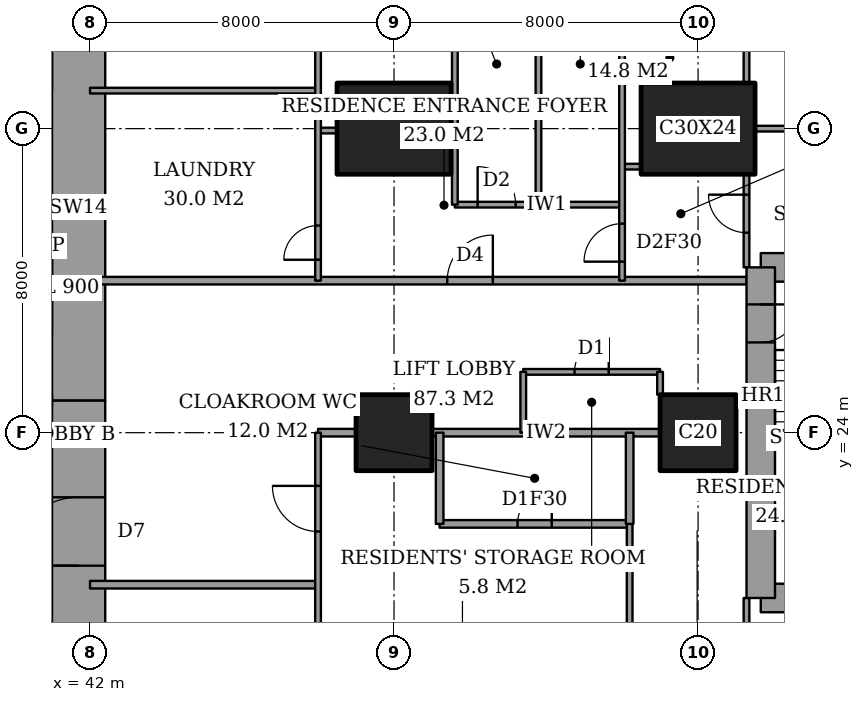
"""IFC4 building model, lengths in metres.
Left out: names, types, materials, properties, quantities, classifications, styles, units other than length and angle.
Written with IfcOpenShell. Run it as: python <this file> out.ifc"""

import sys

from ifc_helpers import new_model, si_unit, direction, frame, frame_2d, origin, origin_2d, place, context, subcontext, project, spatial, rectangle, extrude, element, fill, save


model = new_model("IFC4")
c1 = context("Model", 3, precision=1e-05, world=origin(), true_north=direction((0.0, 1.0)))
c2 = subcontext(c1, "Body", "Model", "MODEL_VIEW")
j1 = project(units=[si_unit("LENGTHUNIT", "METRE"), si_unit("PLANEANGLEUNIT", "RADIAN")], contexts=[c1])
p1 = place(None, origin())
s1 = spatial("IfcSite", under=j1, at=p1, CompositionType="ELEMENT")
p2 = place(p1, origin())
s2 = spatial("IfcBuilding", under=s1, at=p2, CompositionType="ELEMENT")
p3 = place(p2, frame((0.0, 0.0, 44.0)))
s3 = spatial("IfcBuildingStorey", under=s2, at=p3, CompositionType="ELEMENT", Elevation=44.0)
p4 = place(p3, frame((50.0, 24.0, 0.0), z_axis=(0.0, 0.0, 1.0), x_axis=(1.0, 0.0, 0.0)))
e1 = element("IfcColumn", 1, at=p4, inside=s3, PredefinedType="COLUMN", context=c2, shape_type="SweptSolid", body=[
    extrude(rectangle(XDim=2.0, YDim=2.0, at=origin_2d()), origin(), (0.0, 0.0, 1.0), 3.6),
])
p5 = place(p3, frame((50.0, 32.0, 0.0), z_axis=(0.0, 0.0, 1.0), x_axis=(1.0, 0.0, 0.0)))
e2 = element("IfcColumn", 2, at=p5, inside=s3, PredefinedType="COLUMN", context=c2, shape_type="SweptSolid", body=[
    extrude(rectangle(XDim=3.0, YDim=2.4, at=origin_2d()), origin(), (0.0, 0.0, 1.0), 3.6),
])
p6 = place(p3, frame((58.0, 24.0, 0.0), z_axis=(0.0, 0.0, 1.0), x_axis=(1.0, 0.0, 0.0)))
e3 = element("IfcColumn", 3, at=p6, inside=s3, PredefinedType="COLUMN", context=c2, shape_type="SweptSolid", body=[
    extrude(rectangle(XDim=2.0, YDim=2.0, at=origin_2d()), origin(), (0.0, 0.0, 1.0), 3.6),
])
p7 = place(p3, frame((58.0, 32.0, 0.0), z_axis=(0.0, 0.0, 1.0), x_axis=(1.0, 0.0, 0.0)))
e4 = element("IfcColumn", 4, at=p7, inside=s3, PredefinedType="COLUMN", context=c2, shape_type="SweptSolid", body=[
    extrude(rectangle(XDim=3.0, YDim=2.4, at=origin_2d()), origin(), (0.0, 0.0, 1.0), 3.6),
])
p8 = place(p3, frame((41.7, 13.0, 0.0), z_axis=(0.0, 0.0, 1.0), x_axis=(0.0, 1.0, 0.0)))
e5 = element("IfcWall", 5, at=p8, inside=s3, PredefinedType="SHEAR", context=c2, shape_type="SweptSolid", body=[
    extrude(rectangle(XDim=11.85, YDim=1.4, at=frame_2d((5.925, 0.0))), origin(), (0.0, 0.0, 1.0), 3.6),
])
p9 = place(p8, frame((7.5, 0.0, 0.0)))
e6 = element("IfcOpeningElement", 6, at=p9, cuts=e5, PredefinedType="OPENING", context=c2, shape_type="SweptSolid", body=[
    extrude(rectangle(XDim=1.8, YDim=2.4, at=frame_2d((0.9, 1.2))), frame((0.0, 0.71, 0.0), z_axis=(0.0, -1.0, 0.0), x_axis=(1.0, 0.0, 0.0)), (0.0, 0.0, 1.0), 1.42),
])
p10 = place(p3, frame((41.7, 24.85, 0.0), z_axis=(0.0, 0.0, 1.0), x_axis=(0.0, 1.0, 0.0)))
e7 = element("IfcWall", 7, at=p10, inside=s3, PredefinedType="SHEAR", context=c2, shape_type="SweptSolid", body=[
    extrude(rectangle(XDim=10.15, YDim=1.4, at=frame_2d((5.075, 0.0))), origin(), (0.0, 0.0, 1.0), 3.6),
])
for number, where, z_axis, x_axis in (
    (8, (59.65, 19.65, 0.0), (0.0, 0.0, 1.0), (1.0, 0.0, 0.0)),
    (9, (64.1, 28.35, 0.0), (0.0, 0.0, 1.0), (-1.0, 0.0, 0.0)),
):
    element("IfcWall", number, at=place(p3, frame(where, z_axis=z_axis, x_axis=x_axis)), inside=s3, PredefinedType="SHEAR", context=c2, shape_type="SweptSolid", body=[
        extrude(rectangle(XDim=4.45, YDim=0.75, at=frame_2d((2.225, 0.0))), origin(), (0.0, 0.0, 1.0), 3.6),
    ])
p11 = place(p3, frame((59.65, 28.35, 0.0), z_axis=(0.0, 0.0, 1.0), x_axis=(0.0, -1.0, 0.0)))
e10 = element("IfcWall", 10, at=p11, inside=s3, PredefinedType="SHEAR", context=c2, shape_type="SweptSolid", body=[
    extrude(rectangle(XDim=8.7, YDim=0.75, at=frame_2d((4.35, 0.0))), origin(), (0.0, 0.0, 1.0), 3.6),
])
p12 = place(p11, frame((0.975, 0.0, 0.0)))
e11 = element("IfcOpeningElement", 11, at=p12, cuts=e10, PredefinedType="OPENING", context=c2, shape_type="SweptSolid", body=[
    extrude(rectangle(XDim=1.0, YDim=2.1, at=frame_2d((0.5, 1.05))), frame((0.0, 0.385, 0.0), z_axis=(0.0, -1.0, 0.0), x_axis=(1.0, 0.0, 0.0)), (0.0, 0.0, 1.0), 0.77),
])
p13 = place(p3, frame((42.0, 20.0, 0.0), z_axis=(0.0, 0.0, 1.0), x_axis=(1.0, 0.0, 0.0)))
e12 = element("IfcWall", 12, at=p13, inside=s3, PredefinedType="PARTITIONING", context=c2, shape_type="SweptSolid", body=[
    extrude(rectangle(XDim=6.0, YDim=0.2, at=frame_2d((3.0, 0.0))), origin(), (0.0, 0.0, 1.0), 3.35),
])
p14 = place(p3, frame((51.2, 21.6, 0.0), z_axis=(0.0, 0.0, 1.0), x_axis=(1.0, 0.0, 0.0)))
e13 = element("IfcWall", 13, at=p14, inside=s3, PredefinedType="PARTITIONING", context=c2, shape_type="SweptSolid", body=[
    extrude(rectangle(XDim=5.0, YDim=0.2, at=frame_2d((2.5, 0.0))), origin(), (0.0, 0.0, 1.0), 3.35),
])
p15 = place(p14, frame((2.05, 0.0, 0.0)))
e14 = element("IfcOpeningElement", 14, at=p15, cuts=e13, PredefinedType="OPENING", context=c2, shape_type="SweptSolid", body=[
    extrude(rectangle(XDim=0.9, YDim=2.1, at=frame_2d((0.45, 1.05))), frame((0.0, 0.11, 0.0), z_axis=(0.0, -1.0, 0.0), x_axis=(1.0, 0.0, 0.0)), (0.0, 0.0, 1.0), 0.22),
])
p16 = place(p3, frame((48.0, 24.0, 0.0), z_axis=(0.0, 0.0, 1.0), x_axis=(1.0, 0.0, 0.0)))
e15 = element("IfcWall", 15, at=p16, inside=s3, PredefinedType="PARTITIONING", context=c2, shape_type="SweptSolid", body=[
    extrude(rectangle(XDim=1.0, YDim=0.2, at=frame_2d((0.5, 0.0))), origin(), (0.0, 0.0, 1.0), 3.35),
])
p17 = place(p3, frame((51.0, 24.0, 0.0), z_axis=(0.0, 0.0, 1.0), x_axis=(1.0, 0.0, 0.0)))
e16 = element("IfcWall", 16, at=p17, inside=s3, PredefinedType="PARTITIONING", context=c2, shape_type="SweptSolid", body=[
    extrude(rectangle(XDim=6.0, YDim=0.2, at=frame_2d((3.0, 0.0))), origin(), (0.0, 0.0, 1.0), 3.35),
])
p18 = place(p3, frame((53.4, 25.6, 0.0), z_axis=(0.0, 0.0, 1.0), x_axis=(1.0, 0.0, 0.0)))
e17 = element("IfcWall", 17, at=p18, inside=s3, PredefinedType="PARTITIONING", context=c2, shape_type="SweptSolid", body=[
    extrude(rectangle(XDim=3.6, YDim=0.15, at=frame_2d((1.8, 0.0))), origin(), (0.0, 0.0, 1.0), 3.35),
])
p19 = place(p18, frame((1.35, 0.0, 0.0)))
e18 = element("IfcOpeningElement", 18, at=p19, cuts=e17, PredefinedType="OPENING", context=c2, shape_type="SweptSolid", body=[
    extrude(rectangle(XDim=0.9, YDim=2.1, at=frame_2d((0.45, 1.05))), frame((0.0, 0.085, 0.0), z_axis=(0.0, -1.0, 0.0), x_axis=(1.0, 0.0, 0.0)), (0.0, 0.0, 1.0), 0.17),
])
p20 = place(p3, frame((42.0, 28.0, 0.0), z_axis=(0.0, 0.0, 1.0), x_axis=(1.0, 0.0, 0.0)))
e19 = element("IfcWall", 19, at=p20, inside=s3, PredefinedType="PARTITIONING", context=c2, shape_type="SweptSolid", body=[
    extrude(rectangle(XDim=17.275, YDim=0.2, at=frame_2d((8.637, 0.0))), origin(), (0.0, 0.0, 1.0), 3.35),
])
p21 = place(p20, frame((9.4, 0.0, 0.0)))
e20 = element("IfcOpeningElement", 20, at=p21, cuts=e19, PredefinedType="OPENING", context=c2, shape_type="SweptSolid", body=[
    extrude(rectangle(XDim=1.2, YDim=2.4, at=frame_2d((0.6, 1.2))), frame((0.0, 0.11, 0.0), z_axis=(0.0, -1.0, 0.0), x_axis=(1.0, 0.0, 0.0)), (0.0, 0.0, 1.0), 0.22),
])
p22 = place(p3, frame((51.6, 30.0, 0.0), z_axis=(0.0, 0.0, 1.0), x_axis=(1.0, 0.0, 0.0)))
e21 = element("IfcWall", 21, at=p22, inside=s3, PredefinedType="PARTITIONING", context=c2, shape_type="SweptSolid", body=[
    extrude(rectangle(XDim=4.4, YDim=0.15, at=frame_2d((2.2, 0.0))), origin(), (0.0, 0.0, 1.0), 3.35),
])
p23 = place(p22, frame((0.6, 0.0, 0.0)))
e22 = element("IfcOpeningElement", 22, at=p23, cuts=e21, PredefinedType="OPENING", context=c2, shape_type="SweptSolid", body=[
    extrude(rectangle(XDim=1.0, YDim=2.1, at=frame_2d((0.5, 1.05))), frame((0.0, 0.085, 0.0), z_axis=(0.0, -1.0, 0.0), x_axis=(1.0, 0.0, 0.0)), (0.0, 0.0, 1.0), 0.17),
])
p24 = place(p3, frame((56.0, 31.0, 0.0), z_axis=(0.0, 0.0, 1.0), x_axis=(1.0, 0.0, 0.0)))
e23 = element("IfcWall", 23, at=p24, inside=s3, PredefinedType="PARTITIONING", context=c2, shape_type="SweptSolid", body=[
    extrude(rectangle(XDim=0.5, YDim=0.15, at=frame_2d((0.25, 0.0))), origin(), (0.0, 0.0, 1.0), 3.35),
])
p25 = place(p3, frame((48.0, 31.95, 0.0), z_axis=(0.0, 0.0, 1.0), x_axis=(1.0, 0.0, 0.0)))
e24 = element("IfcWall", 24, at=p25, inside=s3, PredefinedType="PARTITIONING", context=c2, shape_type="SweptSolid", body=[
    extrude(rectangle(XDim=0.5, YDim=0.15, at=frame_2d((0.25, 0.0))), origin(), (0.0, 0.0, 1.0), 2.634),
])
p26 = place(p3, frame((59.5, 32.0, 0.0), z_axis=(0.0, 0.0, 1.0), x_axis=(1.0, 0.0, 0.0)))
e25 = element("IfcWall", 25, at=p26, inside=s3, PredefinedType="PARTITIONING", context=c2, shape_type="SweptSolid", body=[
    extrude(rectangle(XDim=5.15, YDim=0.15, at=frame_2d((2.575, 0.0))), origin(), (0.0, 0.0, 1.0), 2.634),
])
p27 = place(p3, frame((42.0, 33.0, 0.0), z_axis=(0.0, 0.0, 1.0), x_axis=(1.0, 0.0, 0.0)))
e26 = element("IfcWall", 26, at=p27, inside=s3, PredefinedType="PARTITIONING", context=c2, shape_type="SweptSolid", body=[
    extrude(rectangle(XDim=6.0, YDim=0.15, at=frame_2d((3.0, 0.0))), origin(), (0.0, 0.0, 1.0), 3.35),
])
p28 = place(p3, frame((48.0, 10.6, 0.0), z_axis=(0.0, 0.0, 1.0), x_axis=(0.0, 1.0, 0.0)))
e27 = element("IfcWall", 27, at=p28, inside=s3, PredefinedType="PARTITIONING", context=c2, shape_type="SweptSolid", body=[
    extrude(rectangle(XDim=13.4, YDim=0.15, at=frame_2d((6.7, 0.0))), origin(), (0.0, 0.0, 1.0), 3.35),
])
p29 = place(p28, frame((10.8, 0.0, 0.0)))
e28 = element("IfcOpeningElement", 28, at=p29, cuts=e27, PredefinedType="OPENING", context=c2, shape_type="SweptSolid", body=[
    extrude(rectangle(XDim=1.2, YDim=2.4, at=frame_2d((0.6, 1.2))), frame((0.0, 0.085, 0.0), z_axis=(0.0, -1.0, 0.0), x_axis=(1.0, 0.0, 0.0)), (0.0, 0.0, 1.0), 0.17),
])
p30 = place(p28, frame((6.7, 0.0, 0.0)))
e29 = element("IfcOpeningElement", 29, at=p30, cuts=e27, PredefinedType="OPENING", context=c2, shape_type="SweptSolid", body=[
    extrude(rectangle(XDim=0.9, YDim=2.1, at=frame_2d((0.45, 1.05))), frame((0.0, 0.085, 0.0), z_axis=(0.0, -1.0, 0.0), x_axis=(1.0, 0.0, 0.0)), (0.0, 0.0, 1.0), 0.17),
])
p31 = place(p3, frame((48.0, 28.0, 0.0), z_axis=(0.0, 0.0, 1.0), x_axis=(0.0, 1.0, 0.0)))
e30 = element("IfcWall", 30, at=p31, inside=s3, PredefinedType="PARTITIONING", context=c2, shape_type="SweptSolid", body=[
    extrude(rectangle(XDim=9.4, YDim=0.15, at=frame_2d((4.7, 0.0))), origin(), (0.0, 0.0, 1.0), 3.35),
])
p32 = place(p31, frame((0.55, 0.0, 0.0)))
e31 = element("IfcOpeningElement", 31, at=p32, cuts=e30, PredefinedType="OPENING", context=c2, shape_type="SweptSolid", body=[
    extrude(rectangle(XDim=0.9, YDim=2.1, at=frame_2d((0.45, 1.05))), frame((0.0, 0.085, 0.0), z_axis=(0.0, -1.0, 0.0), x_axis=(1.0, 0.0, 0.0)), (0.0, 0.0, 1.0), 0.17),
])
p33 = place(p3, frame((51.2, 21.6, 0.0), z_axis=(0.0, 0.0, 1.0), x_axis=(0.0, 1.0, 0.0)))
e32 = element("IfcWall", 32, at=p33, inside=s3, PredefinedType="PARTITIONING", context=c2, shape_type="SweptSolid", body=[
    extrude(rectangle(XDim=2.4, YDim=0.2, at=frame_2d((1.2, 0.0))), origin(), (0.0, 0.0, 1.0), 3.35),
])
p34 = place(p3, frame((51.6, 30.0, 0.0), z_axis=(0.0, 0.0, 1.0), x_axis=(0.0, 1.0, 0.0)))
e33 = element("IfcWall", 33, at=p34, inside=s3, PredefinedType="PARTITIONING", context=c2, shape_type="SweptSolid", body=[
    extrude(rectangle(XDim=7.4, YDim=0.15, at=frame_2d((3.7, 0.0))), origin(), (0.0, 0.0, 1.0), 3.35),
])
p35 = place(p3, frame((53.4, 24.0, 0.0), z_axis=(0.0, 0.0, 1.0), x_axis=(0.0, 1.0, 0.0)))
e34 = element("IfcWall", 34, at=p35, inside=s3, PredefinedType="PARTITIONING", context=c2, shape_type="SweptSolid", body=[
    extrude(rectangle(XDim=1.6, YDim=0.15, at=frame_2d((0.8, 0.0))), origin(), (0.0, 0.0, 1.0), 3.35),
])
p36 = place(p3, frame((53.8, 30.0, 0.0), z_axis=(0.0, 0.0, 1.0), x_axis=(0.0, 1.0, 0.0)))
e35 = element("IfcWall", 35, at=p36, inside=s3, PredefinedType="PARTITIONING", context=c2, shape_type="SweptSolid", body=[
    extrude(rectangle(XDim=7.4, YDim=0.15, at=frame_2d((3.7, 0.0))), origin(), (0.0, 0.0, 1.0), 3.35),
])
p37 = place(p3, frame((56.0, 28.0, 0.0), z_axis=(0.0, 0.0, 1.0), x_axis=(0.0, 1.0, 0.0)))
e36 = element("IfcWall", 36, at=p37, inside=s3, PredefinedType="PARTITIONING", context=c2, shape_type="SweptSolid", body=[
    extrude(rectangle(XDim=9.4, YDim=0.15, at=frame_2d((4.7, 0.0))), origin(), (0.0, 0.0, 1.0), 3.35),
])
p38 = place(p37, frame((0.5, 0.0, 0.0)))
e37 = element("IfcOpeningElement", 37, at=p38, cuts=e36, PredefinedType="OPENING", context=c2, shape_type="SweptSolid", body=[
    extrude(rectangle(XDim=1.0, YDim=2.1, at=frame_2d((0.5, 1.05))), frame((0.0, 0.085, 0.0), z_axis=(0.0, -1.0, 0.0), x_axis=(1.0, 0.0, 0.0)), (0.0, 0.0, 1.0), 0.17),
])
p39 = place(p3, frame((56.2, 21.6, 0.0), z_axis=(0.0, 0.0, 1.0), x_axis=(0.0, 1.0, 0.0)))
e38 = element("IfcWall", 38, at=p39, inside=s3, PredefinedType="PARTITIONING", context=c2, shape_type="SweptSolid", body=[
    extrude(rectangle(XDim=2.4, YDim=0.2, at=frame_2d((1.2, 0.0))), origin(), (0.0, 0.0, 1.0), 3.35),
])
p40 = place(p3, frame((56.2, 10.6, 0.0), z_axis=(0.0, 0.0, 1.0), x_axis=(0.0, 1.0, 0.0)))
e39 = element("IfcWall", 39, at=p40, inside=s3, PredefinedType="PARTITIONING", context=c2, shape_type="SweptSolid", body=[
    extrude(rectangle(XDim=11.0, YDim=0.15, at=frame_2d((5.5, 0.0))), origin(), (0.0, 0.0, 1.0), 3.35),
])
p41 = place(p40, frame((7.0, 0.0, 0.0)))
e40 = element("IfcOpeningElement", 40, at=p41, cuts=e39, PredefinedType="OPENING", context=c2, shape_type="SweptSolid", body=[
    extrude(rectangle(XDim=1.0, YDim=2.1, at=frame_2d((0.5, 1.05))), frame((0.0, 0.085, 0.0), z_axis=(0.0, -1.0, 0.0), x_axis=(1.0, 0.0, 0.0)), (0.0, 0.0, 1.0), 0.17),
])
p42 = place(p3, frame((57.0, 25.0, 0.0), z_axis=(0.0, 0.0, 1.0), x_axis=(0.0, 1.0, 0.0)))
e41 = element("IfcWall", 41, at=p42, inside=s3, PredefinedType="PARTITIONING", context=c2, shape_type="SweptSolid", body=[
    extrude(rectangle(XDim=0.6, YDim=0.15, at=frame_2d((0.3, 0.0))), origin(), (0.0, 0.0, 1.0), 3.35),
])
p43 = place(p3, frame((59.275, 17.2, 0.0), z_axis=(0.0, 0.0, 1.0), x_axis=(0.0, 1.0, 0.0)))
e42 = element("IfcWall", 42, at=p43, inside=s3, PredefinedType="PARTITIONING", context=c2, shape_type="SweptSolid", body=[
    extrude(rectangle(XDim=2.45, YDim=0.15, at=frame_2d((1.225, 0.0))), origin(), (0.0, 0.0, 1.0), 3.35),
])
p44 = place(p43, frame((0.538, 0.0, 0.0)))
e43 = element("IfcOpeningElement", 43, at=p44, cuts=e42, PredefinedType="OPENING", context=c2, shape_type="SweptSolid", body=[
    extrude(rectangle(XDim=1.0, YDim=2.1, at=frame_2d((0.5, 1.05))), frame((0.0, 0.085, 0.0), z_axis=(0.0, -1.0, 0.0), x_axis=(1.0, 0.0, 0.0)), (0.0, 0.0, 1.0), 0.17),
])
p45 = place(p3, frame((59.275, 28.35, 0.0), z_axis=(0.0, 0.0, 1.0), x_axis=(0.0, 1.0, 0.0)))
e44 = element("IfcWall", 44, at=p45, inside=s3, PredefinedType="PARTITIONING", context=c2, shape_type="SweptSolid", body=[
    extrude(rectangle(XDim=2.45, YDim=0.15, at=frame_2d((1.225, 0.0))), origin(), (0.0, 0.0, 1.0), 3.35),
])
p46 = place(p45, frame((0.913, 0.0, 0.0)))
e45 = element("IfcOpeningElement", 45, at=p46, cuts=e44, PredefinedType="OPENING", context=c2, shape_type="SweptSolid", body=[
    extrude(rectangle(XDim=1.0, YDim=2.1, at=frame_2d((0.5, 1.05))), frame((0.0, 0.085, 0.0), z_axis=(0.0, -1.0, 0.0), x_axis=(1.0, 0.0, 0.0)), (0.0, 0.0, 1.0), 0.17),
])
p47 = place(p3, frame((59.275, 33.2, 0.0), z_axis=(0.0, 0.0, 1.0), x_axis=(0.0, 1.0, 0.0)))
e46 = element("IfcWall", 46, at=p47, inside=s3, PredefinedType="PARTITIONING", context=c2, shape_type="SweptSolid", body=[
    extrude(rectangle(XDim=4.2, YDim=0.15, at=frame_2d((2.1, 0.0))), origin(), (0.0, 0.0, 1.0), 3.35),
])
p48 = place(p15, origin())
e47 = element("IfcDoor", 47, at=p48, inside=s3, OperationType="SINGLE_SWING_LEFT", PredefinedType="DOOR", context=c2, shape_type="SweptSolid", body=[
    extrude(rectangle(XDim=0.9, YDim=2.1, at=frame_2d((0.45, 1.05))), frame((0.0, 0.025, 0.0), z_axis=(0.0, -1.0, 0.0), x_axis=(1.0, 0.0, 0.0)), (0.0, 0.0, 1.0), 0.05),
])
fill(e14, e47)
p49 = place(p29, origin())
e48 = element("IfcDoor", 48, at=p49, inside=s3, OperationType="SINGLE_SWING_LEFT", PredefinedType="DOOR", context=c2, shape_type="SweptSolid", body=[
    extrude(rectangle(XDim=1.2, YDim=2.4, at=frame_2d((0.6, 1.2))), frame((0.0, 0.025, 0.0), z_axis=(0.0, -1.0, 0.0), x_axis=(1.0, 0.0, 0.0)), (0.0, 0.0, 1.0), 0.05),
])
fill(e28, e48)
p50 = place(p46, origin())
e49 = element("IfcDoor", 49, at=p50, inside=s3, OperationType="SINGLE_SWING_LEFT", PredefinedType="DOOR", context=c2, shape_type="SweptSolid", body=[
    extrude(rectangle(XDim=1.0, YDim=2.1, at=frame_2d((0.5, 1.05))), frame((0.0, 0.025, 0.0), z_axis=(0.0, -1.0, 0.0), x_axis=(1.0, 0.0, 0.0)), (0.0, 0.0, 1.0), 0.05),
])
fill(e45, e49)
p51 = place(p38, origin())
e50 = element("IfcDoor", 50, at=p51, inside=s3, OperationType="SINGLE_SWING_RIGHT", PredefinedType="DOOR", context=c2, shape_type="SweptSolid", body=[
    extrude(rectangle(XDim=1.0, YDim=2.1, at=frame_2d((0.5, 1.05))), frame((0.0, 0.025, 0.0), z_axis=(0.0, -1.0, 0.0), x_axis=(1.0, 0.0, 0.0)), (0.0, 0.0, 1.0), 0.05),
])
fill(e37, e50)
p52 = place(p21, origin())
e51 = element("IfcDoor", 51, at=p52, inside=s3, OperationType="SINGLE_SWING_LEFT", PredefinedType="DOOR", context=c2, shape_type="SweptSolid", body=[
    extrude(rectangle(XDim=1.2, YDim=2.4, at=frame_2d((0.6, 1.2))), frame((0.0, 0.025, 0.0), z_axis=(0.0, -1.0, 0.0), x_axis=(1.0, 0.0, 0.0)), (0.0, 0.0, 1.0), 0.05),
])
fill(e20, e51)
p53 = place(p23, origin())
e52 = element("IfcDoor", 52, at=p53, inside=s3, OperationType="SINGLE_SWING_RIGHT", PredefinedType="DOOR", context=c2, shape_type="SweptSolid", body=[
    extrude(rectangle(XDim=1.0, YDim=2.1, at=frame_2d((0.5, 1.05))), frame((0.0, 0.025, 0.0), z_axis=(0.0, -1.0, 0.0), x_axis=(1.0, 0.0, 0.0)), (0.0, 0.0, 1.0), 0.05),
])
fill(e22, e52)
p54 = place(p32, origin())
e53 = element("IfcDoor", 53, at=p54, inside=s3, OperationType="SINGLE_SWING_RIGHT", PredefinedType="DOOR", context=c2, shape_type="SweptSolid", body=[
    extrude(rectangle(XDim=0.9, YDim=2.1, at=frame_2d((0.45, 1.05))), frame((0.0, 0.025, 0.0), z_axis=(0.0, -1.0, 0.0), x_axis=(1.0, 0.0, 0.0)), (0.0, 0.0, 1.0), 0.05),
])
fill(e31, e53)
p55 = place(p19, origin())
e54 = element("IfcDoor", 54, at=p55, inside=s3, OperationType="SINGLE_SWING_LEFT", PredefinedType="DOOR", context=c2, shape_type="SweptSolid", body=[
    extrude(rectangle(XDim=0.9, YDim=2.1, at=frame_2d((0.45, 1.05))), frame((0.0, 0.025, 0.0), z_axis=(0.0, -1.0, 0.0), x_axis=(1.0, 0.0, 0.0)), (0.0, 0.0, 1.0), 0.05),
])
fill(e18, e54)
p56 = place(p9, origin())
e55 = element("IfcDoor", 55, at=p56, inside=s3, OperationType="DOUBLE_DOOR_DOUBLE_SWING", PredefinedType="DOOR", context=c2, shape_type="SweptSolid", body=[
    extrude(rectangle(XDim=1.8, YDim=2.4, at=frame_2d((0.9, 1.2))), frame((0.0, 0.025, 0.0), z_axis=(0.0, -1.0, 0.0), x_axis=(1.0, 0.0, 0.0)), (0.0, 0.0, 1.0), 0.05),
])
fill(e6, e55)
p57 = place(p12, origin())
e56 = element("IfcDoor", 56, at=p57, inside=s3, OperationType="SINGLE_SWING_RIGHT", PredefinedType="DOOR", context=c2, shape_type="SweptSolid", body=[
    extrude(rectangle(XDim=1.0, YDim=2.1, at=frame_2d((0.5, 1.05))), frame((0.0, 0.025, 0.0), z_axis=(0.0, -1.0, 0.0), x_axis=(1.0, 0.0, 0.0)), (0.0, 0.0, 1.0), 0.05),
])
fill(e11, e56)
save(model, sys.argv[1])
